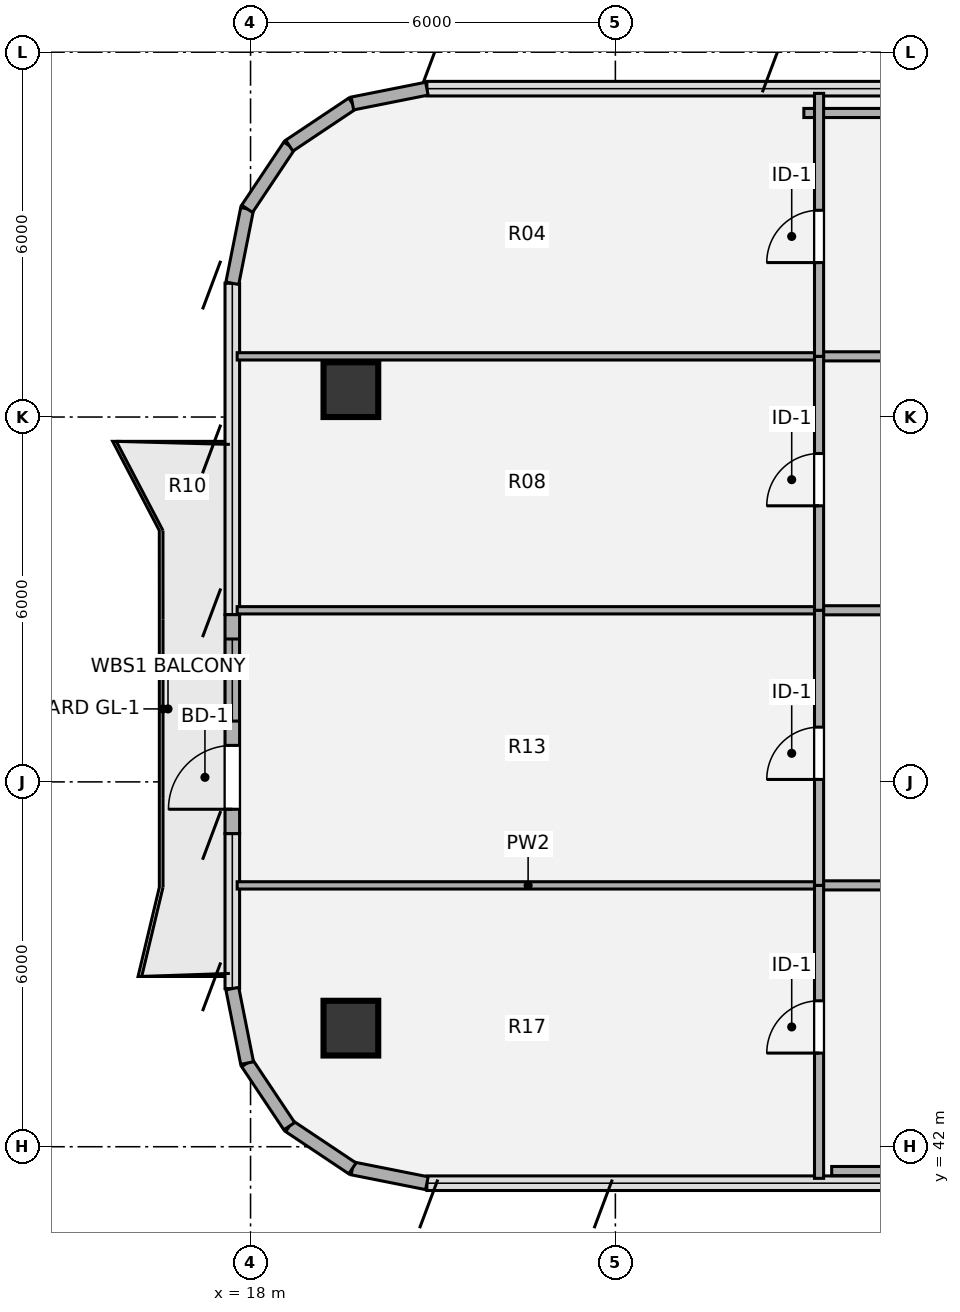
"""IFC4 building model, lengths in metres.
Left out: names, types, materials, properties, quantities, classifications, styles, units other than length and angle.
Written with IfcOpenShell. Run it as: python <this file> out.ifc"""

import sys

from ifc_helpers import new_model, si_unit, direction, frame, frame_2d, origin, origin_2d, place, context, subcontext, project, spatial, rectangle, hollow_circle, extrude, source, transform, mapped, element, fill, save


model = new_model("IFC4")
c1 = context("Model", 3, precision=1e-05, world=origin(), true_north=direction((0.0, 1.0)))
c2 = subcontext(c1, "Body", "Model", "MODEL_VIEW")
j1 = project(units=[si_unit("LENGTHUNIT", "METRE"), si_unit("PLANEANGLEUNIT", "RADIAN")], contexts=[c1])
p1 = place(None, origin())
s1 = spatial("IfcSite", under=j1, at=p1, CompositionType="ELEMENT")
p2 = place(p1, origin())
s2 = spatial("IfcBuilding", under=s1, at=p2, CompositionType="ELEMENT")
p3 = place(p2, frame((0.0, 0.0, 260.82)))
s3 = spatial("IfcBuildingStorey", under=s2, at=p3, CompositionType="ELEMENT", Elevation=260.82)
m1 = source(origin(), c2, "Body", "SweptSolid", [
    extrude(hollow_circle(Radius=0.45, WallThickness=0.032, at=origin_2d()), origin(), (0.0, 0.0, 1.0), 3.78),
])
for number, where, z_axis, x_axis in (
    (1, (19.65, 43.95, 0.0), (0.0, 0.0, 1.0), (1.0, 0.0, 0.0)),
    (2, (19.65, 54.45, 0.0), (0.0, 0.0, 1.0), (1.0, 0.0, 0.0)),
):
    element("IfcColumn", number, at=place(p3, frame(where, z_axis=z_axis, x_axis=x_axis)), inside=s3, PredefinedType="COLUMN", context=c2, shape_type="MappedRepresentation", body=[
        mapped(m1, transform((0.0, 0.0, 0.0), x_axis=(1.0, 0.0, 0.0), y_axis=(0.0, 1.0, 0.0), z_axis=(0.0, 0.0, 1.0), scale=1.0)),
    ])
for number, where, z_axis, x_axis in (
    (3, (20.9, 41.4, 0.0), (0.0, 0.0, 1.0), (-0.981, 0.195, 0.0)),
    (4, (19.675, 41.644, 0.0), (0.0, 0.0, 1.0), (-0.831, 0.556, 0.0)),
    (5, (18.637, 42.337, 0.0), (0.0, 0.0, 1.0), (-0.556, 0.831, 0.0)),
    (6, (17.944, 43.375, 0.0), (0.0, 0.0, 1.0), (-0.195, 0.981, 0.0)),
):
    element("IfcWall", number, at=place(p3, frame(where, z_axis=z_axis, x_axis=x_axis)), inside=s3, PredefinedType="SOLIDWALL", context=c2, shape_type="SweptSolid", body=[
        extrude(rectangle(XDim=1.249, YDim=0.215, at=frame_2d((0.624, 0.0))), origin(), (0.0, 0.0, 1.0), 3.53),
    ])
p4 = place(p3, frame((17.7, 47.15, 0.0), z_axis=(0.0, 0.0, 1.0), x_axis=(0.0, 1.0, 0.0)))
e7 = element("IfcWall", 7, at=p4, inside=s3, PredefinedType="SOLIDWALL", context=c2, shape_type="SweptSolid", body=[
    extrude(rectangle(XDim=3.6, YDim=0.24, at=frame_2d((1.8, 0.0))), origin(), (0.0, 0.0, 1.0), 3.53),
])
p5 = place(p4, frame((0.4, 0.0, 0.0)))
e8 = element("IfcOpeningElement", 8, at=p5, cuts=e7, PredefinedType="OPENING", context=c2, shape_type="SweptSolid", body=[
    extrude(rectangle(XDim=1.05, YDim=2.15, at=origin_2d()), frame((0.525, 0.13, 1.075), z_axis=(0.0, -1.0, 0.0), x_axis=(1.0, 0.0, 0.0)), (0.0, 0.0, 1.0), 0.26),
])
p6 = place(p4, frame((1.85, 0.0, 0.85)))
e9 = element("IfcOpeningElement", 9, at=p6, cuts=e7, PredefinedType="OPENING", context=c2, shape_type="SweptSolid", body=[
    extrude(rectangle(XDim=1.35, YDim=1.35, at=origin_2d()), frame((0.675, 0.13, 0.675), z_axis=(0.0, -1.0, 0.0), x_axis=(1.0, 0.0, 0.0)), (0.0, 0.0, 1.0), 0.26),
])
for number, where, z_axis, x_axis in (
    (10, (17.7, 56.2, 0.0), (0.0, 0.0, 1.0), (0.195, 0.981, 0.0)),
    (11, (17.944, 57.425, 0.0), (0.0, 0.0, 1.0), (0.556, 0.831, 0.0)),
    (12, (18.637, 58.463, 0.0), (0.0, 0.0, 1.0), (0.831, 0.556, 0.0)),
    (13, (19.675, 59.156, 0.0), (0.0, 0.0, 1.0), (0.981, 0.195, 0.0)),
):
    element("IfcWall", number, at=place(p3, frame(where, z_axis=z_axis, x_axis=x_axis)), inside=s3, PredefinedType="SOLIDWALL", context=c2, shape_type="SweptSolid", body=[
        extrude(rectangle(XDim=1.249, YDim=0.215, at=frame_2d((0.624, 0.0))), origin(), (0.0, 0.0, 1.0), 3.53),
    ])
p7 = place(p3, frame((27.558, 41.6, 0.0), z_axis=(0.0, 0.0, 1.0), x_axis=(1.0, 0.0, 0.0)))
e14 = element("IfcWall", 14, at=p7, inside=s3, PredefinedType="PARTITIONING", context=c2, shape_type="SweptSolid", body=[
    extrude(rectangle(XDim=5.992, YDim=0.15, at=frame_2d((2.996, 0.0))), origin(), (0.0, 0.0, 1.0), 3.5),
])
p8 = place(p3, frame((17.78, 46.298, 0.0), z_axis=(0.0, 0.0, 1.0), x_axis=(1.0, 0.0, 0.0)))
e15 = element("IfcWall", 15, at=p8, inside=s3, PredefinedType="PARTITIONING", context=c2, shape_type="SweptSolid", body=[
    extrude(rectangle(XDim=9.57, YDim=0.12, at=frame_2d((4.785, 0.0))), origin(), (0.0, 0.0, 1.0), 3.055),
])
p9 = place(p3, frame((27.35, 46.298, 0.0), z_axis=(0.0, 0.0, 1.0), x_axis=(1.0, 0.0, 0.0)))
e16 = element("IfcWall", 16, at=p9, inside=s3, PredefinedType="PARTITIONING", context=c2, shape_type="SweptSolid", body=[
    extrude(rectangle(XDim=6.2, YDim=0.15, at=frame_2d((3.1, 0.0))), origin(), (0.0, 0.0, 1.0), 3.055),
])
p10 = place(p3, frame((17.78, 50.822, 0.0), z_axis=(0.0, 0.0, 1.0), x_axis=(1.0, 0.0, 0.0)))
e17 = element("IfcWall", 17, at=p10, inside=s3, PredefinedType="PARTITIONING", context=c2, shape_type="SweptSolid", body=[
    extrude(rectangle(XDim=9.57, YDim=0.12, at=frame_2d((4.785, 0.0))), origin(), (0.0, 0.0, 1.0), 2.982),
])
p11 = place(p3, frame((27.35, 50.822, 0.0), z_axis=(0.0, 0.0, 1.0), x_axis=(1.0, 0.0, 0.0)))
e18 = element("IfcWall", 18, at=p11, inside=s3, PredefinedType="PARTITIONING", context=c2, shape_type="SweptSolid", body=[
    extrude(rectangle(XDim=6.2, YDim=0.15, at=frame_2d((3.1, 0.0))), origin(), (0.0, 0.0, 1.0), 2.982),
])
p12 = place(p3, frame((17.78, 54.998, 0.0), z_axis=(0.0, 0.0, 1.0), x_axis=(1.0, 0.0, 0.0)))
e19 = element("IfcWall", 19, at=p12, inside=s3, PredefinedType="PARTITIONING", context=c2, shape_type="SweptSolid", body=[
    extrude(rectangle(XDim=9.57, YDim=0.12, at=frame_2d((4.785, 0.0))), origin(), (0.0, 0.0, 1.0), 3.5),
])
p13 = place(p3, frame((27.35, 54.998, 0.0), z_axis=(0.0, 0.0, 1.0), x_axis=(1.0, 0.0, 0.0)))
e20 = element("IfcWall", 20, at=p13, inside=s3, PredefinedType="PARTITIONING", context=c2, shape_type="SweptSolid", body=[
    extrude(rectangle(XDim=6.2, YDim=0.15, at=frame_2d((3.1, 0.0))), origin(), (0.0, 0.0, 1.0), 3.259),
])
p14 = place(p3, frame((27.1, 59.0, 0.0), z_axis=(0.0, 0.0, 1.0), x_axis=(1.0, 0.0, 0.0)))
e21 = element("IfcWall", 21, at=p14, inside=s3, PredefinedType="PARTITIONING", context=c2, shape_type="SweptSolid", body=[
    extrude(rectangle(XDim=17.8, YDim=0.15, at=frame_2d((8.9, 0.0))), origin(), (0.0, 0.0, 1.0), 3.308),
])
p15 = place(p14, frame((8.375, 0.0, 0.0)))
e22 = element("IfcOpeningElement", 22, at=p15, cuts=e21, PredefinedType="OPENING", context=c2, shape_type="SweptSolid", body=[
    extrude(rectangle(XDim=1.05, YDim=2.1, at=origin_2d()), frame((0.525, 0.085, 1.05), z_axis=(0.0, -1.0, 0.0), x_axis=(1.0, 0.0, 0.0)), (0.0, 0.0, 1.0), 0.17),
])
p16 = place(p3, frame((27.35, 41.48, 0.0), z_axis=(0.0, 0.0, 1.0), x_axis=(0.0, 1.0, 0.0)))
e23 = element("IfcWall", 23, at=p16, inside=s3, PredefinedType="PARTITIONING", context=c2, shape_type="SweptSolid", body=[
    extrude(rectangle(XDim=4.818, YDim=0.15, at=frame_2d((2.409, 0.0))), origin(), (0.0, 0.0, 1.0), 3.5),
])
p17 = place(p16, frame((2.06, 0.0, 0.0)))
e24 = element("IfcOpeningElement", 24, at=p17, cuts=e23, PredefinedType="OPENING", context=c2, shape_type="SweptSolid", body=[
    extrude(rectangle(XDim=0.86, YDim=2.1, at=origin_2d()), frame((0.43, 0.085, 1.05), z_axis=(0.0, -1.0, 0.0), x_axis=(1.0, 0.0, 0.0)), (0.0, 0.0, 1.0), 0.17),
])
p18 = place(p3, frame((27.35, 46.298, 0.0), z_axis=(0.0, 0.0, 1.0), x_axis=(0.0, 1.0, 0.0)))
e25 = element("IfcWall", 25, at=p18, inside=s3, PredefinedType="PARTITIONING", context=c2, shape_type="SweptSolid", body=[
    extrude(rectangle(XDim=4.524, YDim=0.15, at=frame_2d((2.262, 0.0))), origin(), (0.0, 0.0, 1.0), 3.5),
])
p19 = place(p18, frame((1.742, 0.0, 0.0)))
e26 = element("IfcOpeningElement", 26, at=p19, cuts=e25, PredefinedType="OPENING", context=c2, shape_type="SweptSolid", body=[
    extrude(rectangle(XDim=0.86, YDim=2.1, at=origin_2d()), frame((0.43, 0.085, 1.05), z_axis=(0.0, -1.0, 0.0), x_axis=(1.0, 0.0, 0.0)), (0.0, 0.0, 1.0), 0.17),
])
p20 = place(p3, frame((27.35, 50.822, 0.0), z_axis=(0.0, 0.0, 1.0), x_axis=(0.0, 1.0, 0.0)))
e27 = element("IfcWall", 27, at=p20, inside=s3, PredefinedType="PARTITIONING", context=c2, shape_type="SweptSolid", body=[
    extrude(rectangle(XDim=4.176, YDim=0.15, at=frame_2d((2.088, 0.0))), origin(), (0.0, 0.0, 1.0), 3.5),
])
p21 = place(p20, frame((1.718, 0.0, 0.0)))
e28 = element("IfcOpeningElement", 28, at=p21, cuts=e27, PredefinedType="OPENING", context=c2, shape_type="SweptSolid", body=[
    extrude(rectangle(XDim=0.86, YDim=2.1, at=origin_2d()), frame((0.43, 0.085, 1.05), z_axis=(0.0, -1.0, 0.0), x_axis=(1.0, 0.0, 0.0)), (0.0, 0.0, 1.0), 0.17),
])
p22 = place(p3, frame((27.35, 54.998, 0.0), z_axis=(0.0, 0.0, 1.0), x_axis=(0.0, 1.0, 0.0)))
e29 = element("IfcWall", 29, at=p22, inside=s3, PredefinedType="PARTITIONING", context=c2, shape_type="SweptSolid", body=[
    extrude(rectangle(XDim=4.324, YDim=0.15, at=frame_2d((2.162, 0.0))), origin(), (0.0, 0.0, 1.0), 3.5),
])
p23 = place(p22, frame((1.542, 0.0, 0.0)))
e30 = element("IfcOpeningElement", 30, at=p23, cuts=e29, PredefinedType="OPENING", context=c2, shape_type="SweptSolid", body=[
    extrude(rectangle(XDim=0.86, YDim=2.1, at=origin_2d()), frame((0.43, 0.085, 1.05), z_axis=(0.0, -1.0, 0.0), x_axis=(1.0, 0.0, 0.0)), (0.0, 0.0, 1.0), 0.17),
])
m2 = source(origin(), c2, "Body", "SweptSolid", [
    extrude(rectangle(XDim=1.05, YDim=2.15, at=origin_2d()), frame((0.525, 0.025, 1.075), z_axis=(0.0, -1.0, 0.0), x_axis=(1.0, 0.0, 0.0)), (0.0, 0.0, 1.0), 0.05),
])
p24 = place(p5, origin())
e31 = element("IfcDoor", 31, at=p24, inside=s3, OperationType="SINGLE_SWING_LEFT", PredefinedType="DOOR", context=c2, shape_type="MappedRepresentation", body=[
    mapped(m2, transform((0.0, 0.0, 0.0), x_axis=(1.0, 0.0, 0.0), y_axis=(0.0, 1.0, 0.0), z_axis=(0.0, 0.0, 1.0), scale=1.0)),
])
fill(e8, e31)
m3 = source(origin(), c2, "Body", "SweptSolid", [
    extrude(rectangle(XDim=1.35, YDim=1.35, at=origin_2d()), frame((0.675, 0.03, 0.675), z_axis=(0.0, -1.0, 0.0), x_axis=(1.0, 0.0, 0.0)), (0.0, 0.0, 1.0), 0.06),
])
p25 = place(p6, origin())
e32 = element("IfcWindow", 32, at=p25, inside=s3, PartitioningType="SINGLE_PANEL", PredefinedType="WINDOW", context=c2, shape_type="MappedRepresentation", body=[
    mapped(m3, transform((0.0, 0.0, 0.0), x_axis=(1.0, 0.0, 0.0), y_axis=(0.0, 1.0, 0.0), z_axis=(0.0, 0.0, 1.0), scale=1.0)),
])
fill(e9, e32)
m4 = source(origin(), c2, "Body", "SweptSolid", [
    extrude(rectangle(XDim=0.86, YDim=2.1, at=origin_2d()), frame((0.43, 0.025, 1.05), z_axis=(0.0, -1.0, 0.0), x_axis=(1.0, 0.0, 0.0)), (0.0, 0.0, 1.0), 0.05),
])
p26 = place(p17, origin())
e33 = element("IfcDoor", 33, at=p26, inside=s3, OperationType="SINGLE_SWING_LEFT", PredefinedType="DOOR", context=c2, shape_type="MappedRepresentation", body=[
    mapped(m4, transform((0.0, 0.0, 0.0), x_axis=(1.0, 0.0, 0.0), y_axis=(0.0, 1.0, 0.0), z_axis=(0.0, 0.0, 1.0), scale=1.0)),
])
fill(e24, e33)
p27 = place(p19, origin())
e34 = element("IfcDoor", 34, at=p27, inside=s3, OperationType="SINGLE_SWING_LEFT", PredefinedType="DOOR", context=c2, shape_type="MappedRepresentation", body=[
    mapped(m4, transform((0.0, 0.0, 0.0), x_axis=(1.0, 0.0, 0.0), y_axis=(0.0, 1.0, 0.0), z_axis=(0.0, 0.0, 1.0), scale=1.0)),
])
fill(e26, e34)
p28 = place(p21, origin())
e35 = element("IfcDoor", 35, at=p28, inside=s3, OperationType="SINGLE_SWING_LEFT", PredefinedType="DOOR", context=c2, shape_type="MappedRepresentation", body=[
    mapped(m4, transform((0.0, 0.0, 0.0), x_axis=(1.0, 0.0, 0.0), y_axis=(0.0, 1.0, 0.0), z_axis=(0.0, 0.0, 1.0), scale=1.0)),
])
fill(e28, e35)
p29 = place(p23, origin())
e36 = element("IfcDoor", 36, at=p29, inside=s3, OperationType="SINGLE_SWING_LEFT", PredefinedType="DOOR", context=c2, shape_type="MappedRepresentation", body=[
    mapped(m4, transform((0.0, 0.0, 0.0), x_axis=(1.0, 0.0, 0.0), y_axis=(0.0, 1.0, 0.0), z_axis=(0.0, 0.0, 1.0), scale=1.0)),
])
fill(e30, e36)
save(model, sys.argv[1])
